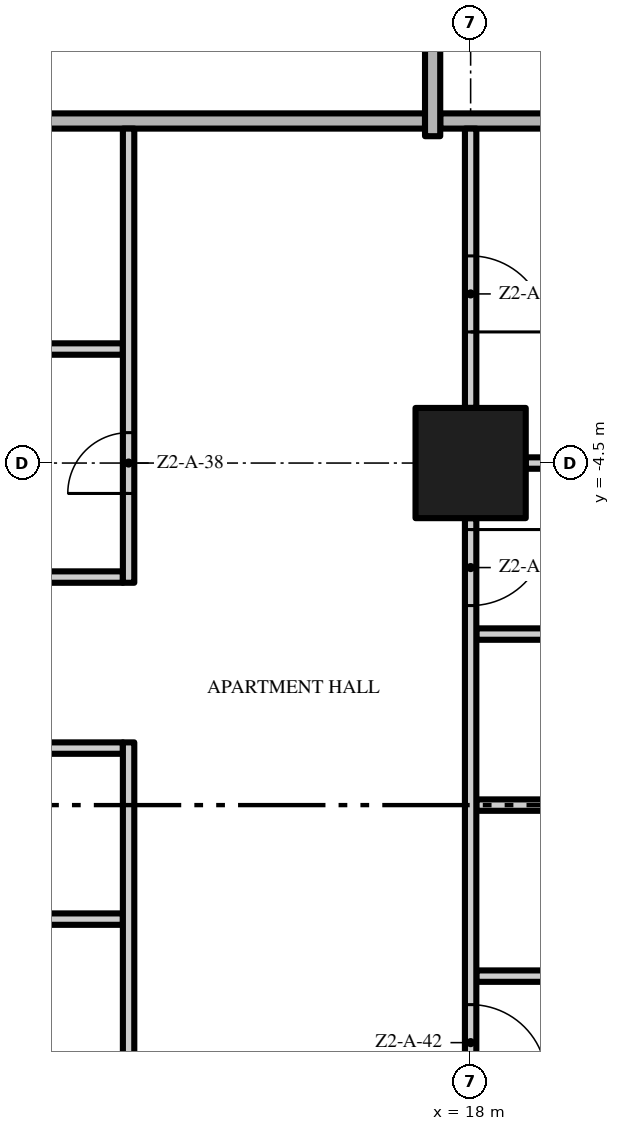
"""IFC4 building model, lengths in metres.
Left out: names, types, materials, properties, quantities, classifications, styles, units other than length and angle.
Written with IfcOpenShell. Run it as: python <this file> out.ifc"""

import sys

from ifc_helpers import new_model, si_unit, direction, frame, frame_2d, origin, origin_2d, place, context, subcontext, project, spatial, rectangle, extrude, element, fill, save


model = new_model("IFC4")
c1 = context("Model", 3, precision=1e-05, world=origin(), true_north=direction((0.0, 1.0)))
c2 = subcontext(c1, "Body", "Model", "MODEL_VIEW")
j1 = project(units=[si_unit("LENGTHUNIT", "METRE"), si_unit("PLANEANGLEUNIT", "RADIAN")], contexts=[c1])
p1 = place(None, origin())
s1 = spatial("IfcSite", under=j1, at=p1, CompositionType="ELEMENT")
p2 = place(p1, origin())
s2 = spatial("IfcBuilding", under=s1, at=p2, CompositionType="ELEMENT")
p3 = place(p2, frame((0.0, 0.0, 77.0)))
s3 = spatial("IfcBuildingStorey", under=s2, at=p3, CompositionType="ELEMENT", Elevation=77.0)
p4 = place(p3, frame((18.0, -4.5, 0.0), z_axis=(0.0, 0.0, 1.0), x_axis=(1.0, 0.0, 0.0)))
e1 = element("IfcColumn", 1, at=p4, inside=s3, PredefinedType="COLUMN", context=c2, shape_type="SweptSolid", body=[
    extrude(rectangle(XDim=1.45, YDim=1.45, at=origin_2d()), origin(), (0.0, 0.0, 1.0), 3.5),
])
p5 = place(p3, frame((18.075, -11.25, 0.0), z_axis=(0.0, 0.0, 1.0), x_axis=(1.0, 0.0, 0.0)))
e2 = element("IfcWall", 2, at=p5, inside=s3, PredefinedType="PARTITIONING", context=c2, shape_type="SweptSolid", body=[
    extrude(rectangle(XDim=2.85, YDim=0.15, at=frame_2d((1.425, 0.0))), origin(), (0.0, 0.0, 1.0), 3.5),
])
p6 = place(p3, frame((9.075, -10.5, 0.0), z_axis=(0.0, 0.0, 1.0), x_axis=(1.0, 0.0, 0.0)))
e3 = element("IfcWall", 3, at=p6, inside=s3, PredefinedType="PARTITIONING", context=c2, shape_type="SweptSolid", body=[
    extrude(rectangle(XDim=4.35, YDim=0.15, at=frame_2d((2.175, 0.0))), origin(), (0.0, 0.0, 1.0), 3.5),
])
p7 = place(p3, frame((18.075, -9.0, 0.0), z_axis=(0.0, 0.0, 1.0), x_axis=(1.0, 0.0, 0.0)))
e4 = element("IfcWall", 4, at=p7, inside=s3, PredefinedType="PARTITIONING", context=c2, shape_type="SweptSolid", body=[
    extrude(rectangle(XDim=2.85, YDim=0.15, at=frame_2d((1.425, 0.0))), origin(), (0.0, 0.0, 1.0), 3.5),
])
p8 = place(p3, frame((13.425, -8.25, 0.0), z_axis=(0.0, 0.0, 1.0), x_axis=(-1.0, 0.0, 0.0)))
e5 = element("IfcWall", 5, at=p8, inside=s3, PredefinedType="PARTITIONING", context=c2, shape_type="SweptSolid", body=[
    extrude(rectangle(XDim=4.35, YDim=0.15, at=frame_2d((2.175, 0.0))), origin(), (0.0, 0.0, 1.0), 3.5),
])
p9 = place(p8, frame((1.7, 0.0, 0.0)))
e6 = element("IfcOpeningElement", 6, at=p9, cuts=e5, PredefinedType="OPENING", context=c2, shape_type="SweptSolid", body=[
    extrude(rectangle(XDim=0.9, YDim=2.1, at=frame_2d((0.45, 1.05))), frame((0.0, 0.085, 0.0), z_axis=(0.0, -1.0, 0.0), x_axis=(1.0, 0.0, 0.0)), (0.0, 0.0, 1.0), 0.17),
])
p10 = place(p3, frame((18.075, -6.75, 0.0), z_axis=(0.0, 0.0, 1.0), x_axis=(1.0, 0.0, 0.0)))
e7 = element("IfcWall", 7, at=p10, inside=s3, PredefinedType="PARTITIONING", context=c2, shape_type="SweptSolid", body=[
    extrude(rectangle(XDim=2.85, YDim=0.15, at=frame_2d((1.425, 0.0))), origin(), (0.0, 0.0, 1.0), 3.5),
])
p11 = place(p3, frame((9.075, -6.0, 0.0), z_axis=(0.0, 0.0, 1.0), x_axis=(1.0, 0.0, 0.0)))
e8 = element("IfcWall", 8, at=p11, inside=s3, PredefinedType="PARTITIONING", context=c2, shape_type="SweptSolid", body=[
    extrude(rectangle(XDim=4.35, YDim=0.15, at=frame_2d((2.175, 0.0))), origin(), (0.0, 0.0, 1.0), 3.5),
])
p12 = place(p3, frame((18.725, -4.5, 0.0), z_axis=(0.0, 0.0, 1.0), x_axis=(1.0, 0.0, 0.0)))
e9 = element("IfcWall", 9, at=p12, inside=s3, PredefinedType="PARTITIONING", context=c2, shape_type="SweptSolid", body=[
    extrude(rectangle(XDim=6.925, YDim=0.15, at=frame_2d((3.462, 0.0))), origin(), (0.0, 0.0, 1.0), 3.5),
])
p13 = place(p3, frame((9.075, -3.0, 0.0), z_axis=(0.0, 0.0, 1.0), x_axis=(1.0, 0.0, 0.0)))
e10 = element("IfcWall", 10, at=p13, inside=s3, PredefinedType="PARTITIONING", context=c2, shape_type="SweptSolid", body=[
    extrude(rectangle(XDim=4.35, YDim=0.15, at=frame_2d((2.175, 0.0))), origin(), (0.0, 0.0, 1.0), 3.5),
])
p14 = place(p3, frame((4.6, 0.0, 0.0), z_axis=(0.0, 0.0, 1.0), x_axis=(1.0, 0.0, 0.0)))
e11 = element("IfcWall", 11, at=p14, inside=s3, PredefinedType="PARTITIONING", context=c2, shape_type="SweptSolid", body=[
    extrude(rectangle(XDim=12.8, YDim=0.2, at=frame_2d((6.4, 0.0))), origin(), (0.0, 0.0, 1.0), 3.5),
])
p15 = place(p3, frame((17.6, 0.0, 0.0), z_axis=(0.0, 0.0, 1.0), x_axis=(1.0, 0.0, 0.0)))
e12 = element("IfcWall", 12, at=p15, inside=s3, PredefinedType="PARTITIONING", context=c2, shape_type="SweptSolid", body=[
    extrude(rectangle(XDim=9.1, YDim=0.2, at=frame_2d((4.55, 0.0))), origin(), (0.0, 0.0, 1.0), 3.5),
])
p16 = place(p3, frame((13.5, -22.2, 0.0), z_axis=(0.0, 0.0, 1.0), x_axis=(0.0, 1.0, 0.0)))
e13 = element("IfcWall", 13, at=p16, inside=s3, PredefinedType="PARTITIONING", context=c2, shape_type="SweptSolid", body=[
    extrude(rectangle(XDim=14.025, YDim=0.15, at=frame_2d((7.013, 0.0))), origin(), (0.0, 0.0, 1.0), 3.5),
])
p17 = place(p16, frame((0.2, 0.0, 0.0)))
e14 = element("IfcOpeningElement", 14, at=p17, cuts=e13, PredefinedType="OPENING", context=c2, shape_type="SweptSolid", body=[
    extrude(rectangle(XDim=0.8, YDim=2.0, at=frame_2d((0.4, 1.0))), frame((0.0, 0.085, 0.0), z_axis=(0.0, -1.0, 0.0), x_axis=(1.0, 0.0, 0.0)), (0.0, 0.0, 1.0), 0.17),
])
p18 = place(p16, frame((7.8, 0.0, 0.0)))
e15 = element("IfcOpeningElement", 15, at=p18, cuts=e13, PredefinedType="OPENING", context=c2, shape_type="SweptSolid", body=[
    extrude(rectangle(XDim=1.0, YDim=2.4, at=frame_2d((0.5, 1.2))), frame((0.0, 0.085, 0.0), z_axis=(0.0, -1.0, 0.0), x_axis=(1.0, 0.0, 0.0)), (0.0, 0.0, 1.0), 0.17),
])
p19 = place(p3, frame((13.5, -6.075, 0.0), z_axis=(0.0, 0.0, 1.0), x_axis=(0.0, 1.0, 0.0)))
e16 = element("IfcWall", 16, at=p19, inside=s3, PredefinedType="PARTITIONING", context=c2, shape_type="SweptSolid", body=[
    extrude(rectangle(XDim=5.975, YDim=0.15, at=frame_2d((2.987, 0.0))), origin(), (0.0, 0.0, 1.0), 3.5),
])
p20 = place(p19, frame((1.175, 0.0, 0.0)))
e17 = element("IfcOpeningElement", 17, at=p20, cuts=e16, PredefinedType="OPENING", context=c2, shape_type="SweptSolid", body=[
    extrude(rectangle(XDim=0.8, YDim=2.0, at=frame_2d((0.4, 1.0))), frame((0.0, 0.085, 0.0), z_axis=(0.0, -1.0, 0.0), x_axis=(1.0, 0.0, 0.0)), (0.0, 0.0, 1.0), 0.17),
])
p21 = place(p3, frame((17.5, -0.2, 0.0), z_axis=(0.0, 0.0, 1.0), x_axis=(0.0, 1.0, 0.0)))
e18 = element("IfcWall", 18, at=p21, inside=s3, PredefinedType="PARTITIONING", context=c2, shape_type="SweptSolid", body=[
    extrude(rectangle(XDim=3.975, YDim=0.2, at=frame_2d((1.988, 0.0))), origin(), (0.0, 0.0, 1.0), 3.5),
])
p22 = place(p3, frame((18.0, -5.225, 0.0), z_axis=(0.0, 0.0, 1.0), x_axis=(0.0, -1.0, 0.0)))
e19 = element("IfcWall", 19, at=p22, inside=s3, PredefinedType="PARTITIONING", context=c2, shape_type="SweptSolid", body=[
    extrude(rectangle(XDim=7.55, YDim=0.15, at=frame_2d((3.775, 0.0))), origin(), (0.0, 0.0, 1.0), 3.5),
])
p23 = place(p22, frame((6.4, 0.0, 0.0)))
e20 = element("IfcOpeningElement", 20, at=p23, cuts=e19, PredefinedType="OPENING", context=c2, shape_type="SweptSolid", body=[
    extrude(rectangle(XDim=1.0, YDim=2.4, at=frame_2d((0.5, 1.2))), frame((0.0, 0.085, 0.0), z_axis=(0.0, -1.0, 0.0), x_axis=(1.0, 0.0, 0.0)), (0.0, 0.0, 1.0), 0.17),
])
p24 = place(p22, frame((0.15, 0.0, 0.0)))
e21 = element("IfcOpeningElement", 21, at=p24, cuts=e19, PredefinedType="OPENING", context=c2, shape_type="SweptSolid", body=[
    extrude(rectangle(XDim=1.0, YDim=2.4, at=frame_2d((0.5, 1.2))), frame((0.0, 0.085, 0.0), z_axis=(0.0, -1.0, 0.0), x_axis=(1.0, 0.0, 0.0)), (0.0, 0.0, 1.0), 0.17),
])
p25 = place(p3, frame((18.0, -0.1, 0.0), z_axis=(0.0, 0.0, 1.0), x_axis=(0.0, -1.0, 0.0)))
e22 = element("IfcWall", 22, at=p25, inside=s3, PredefinedType="PARTITIONING", context=c2, shape_type="SweptSolid", body=[
    extrude(rectangle(XDim=3.675, YDim=0.15, at=frame_2d((1.837, 0.0))), origin(), (0.0, 0.0, 1.0), 3.5),
])
p26 = place(p25, frame((1.675, 0.0, 0.0)))
e23 = element("IfcOpeningElement", 23, at=p26, cuts=e22, PredefinedType="OPENING", context=c2, shape_type="SweptSolid", body=[
    extrude(rectangle(XDim=1.0, YDim=2.4, at=frame_2d((0.5, 1.2))), frame((0.0, 0.085, 0.0), z_axis=(0.0, -1.0, 0.0), x_axis=(1.0, 0.0, 0.0)), (0.0, 0.0, 1.0), 0.17),
])
p27 = place(p20, origin())
e24 = element("IfcDoor", 24, at=p27, inside=s3, OperationType="SINGLE_SWING_LEFT", PredefinedType="DOOR", context=c2, shape_type="SweptSolid", body=[
    extrude(rectangle(XDim=0.8, YDim=2.0, at=frame_2d((0.4, 1.0))), frame((0.0, 0.025, 0.0), z_axis=(0.0, -1.0, 0.0), x_axis=(1.0, 0.0, 0.0)), (0.0, 0.0, 1.0), 0.05),
])
fill(e17, e24)
p28 = place(p23, origin())
e25 = element("IfcDoor", 25, at=p28, inside=s3, OperationType="SINGLE_SWING_RIGHT", PredefinedType="DOOR", context=c2, shape_type="SweptSolid", body=[
    extrude(rectangle(XDim=1.0, YDim=2.4, at=frame_2d((0.5, 1.2))), frame((0.0, 0.025, 0.0), z_axis=(0.0, -1.0, 0.0), x_axis=(1.0, 0.0, 0.0)), (0.0, 0.0, 1.0), 0.05),
])
fill(e20, e25)
p29 = place(p24, origin())
e26 = element("IfcDoor", 26, at=p29, inside=s3, OperationType="SINGLE_SWING_LEFT", PredefinedType="DOOR", context=c2, shape_type="SweptSolid", body=[
    extrude(rectangle(XDim=1.0, YDim=2.4, at=frame_2d((0.5, 1.2))), frame((0.0, 0.025, 0.0), z_axis=(0.0, -1.0, 0.0), x_axis=(1.0, 0.0, 0.0)), (0.0, 0.0, 1.0), 0.05),
])
fill(e21, e26)
p30 = place(p26, origin())
e27 = element("IfcDoor", 27, at=p30, inside=s3, OperationType="SINGLE_SWING_RIGHT", PredefinedType="DOOR", context=c2, shape_type="SweptSolid", body=[
    extrude(rectangle(XDim=1.0, YDim=2.4, at=frame_2d((0.5, 1.2))), frame((0.0, 0.025, 0.0), z_axis=(0.0, -1.0, 0.0), x_axis=(1.0, 0.0, 0.0)), (0.0, 0.0, 1.0), 0.05),
])
fill(e23, e27)
save(model, sys.argv[1])
